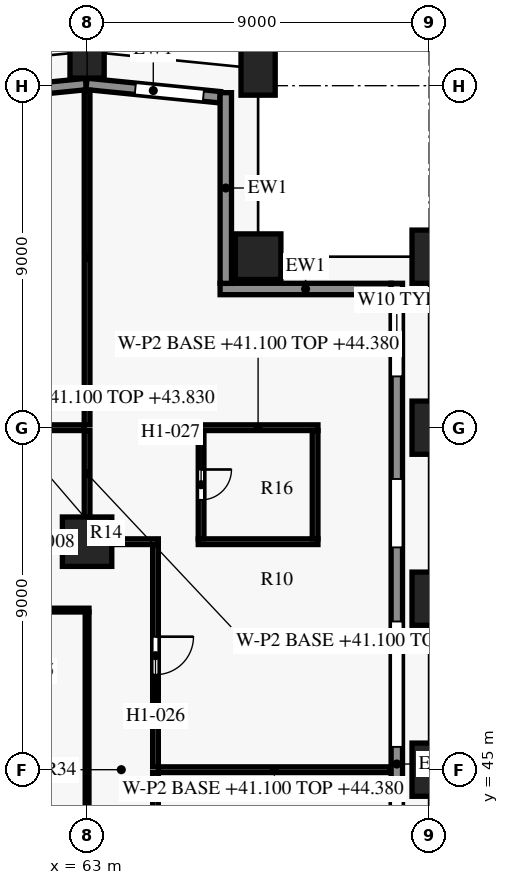
"""IFC4 building model, lengths in metres.
Left out: names, types, materials, properties, quantities, classifications, styles, units other than length and angle.
Written with IfcOpenShell. Run it as: python <this file> out.ifc"""

import sys

from ifc_helpers import new_model, si_unit, direction, frame, frame_2d, origin, origin_2d, place, context, subcontext, project, spatial, rectangle, extrude, element, fill, save


model = new_model("IFC4")
c1 = context("Model", 3, precision=1e-05, world=origin(), true_north=direction((0.0, 1.0)))
c2 = subcontext(c1, "Body", "Model", "MODEL_VIEW")
j1 = project(units=[si_unit("LENGTHUNIT", "METRE"), si_unit("PLANEANGLEUNIT", "RADIAN")], contexts=[c1])
p1 = place(None, origin())
s1 = spatial("IfcSite", under=j1, at=p1, CompositionType="ELEMENT")
p2 = place(p1, origin())
s2 = spatial("IfcBuilding", under=s1, at=p2, CompositionType="ELEMENT")
p3 = place(p2, frame((0.0, 0.0, 41.1)))
s3 = spatial("IfcBuildingStorey", under=s2, at=p3, CompositionType="ELEMENT", Elevation=41.1)
for number, where, z_axis, x_axis in (
    (1, (72.0, 45.0, 0.0), (0.0, 0.0, 1.0), (0.0, 1.0, 0.0)),
    (2, (72.0, 49.5, 0.0), (0.0, 0.0, 1.0), (0.0, 1.0, 0.0)),
    (3, (72.0, 54.0, 0.0), (0.0, 0.0, 1.0), (0.0, 1.0, 0.0)),
    (4, (72.0, 58.5, 0.0), (0.0, 0.0, 1.0), (0.0, 1.0, 0.0)),
    (5, (67.5, 63.45, 0.0), (0.0, 0.0, 1.0), (-0.995, 0.1, 0.0)),
    (6, (63.0, 63.9, 0.0), (0.0, 0.0, 1.0), (-1.0, 0.0, 0.0)),
):
    element("IfcColumn", number, at=place(p3, frame(where, z_axis=z_axis, x_axis=x_axis)), inside=s3, PredefinedType="COLUMN", context=c2, shape_type="SweptSolid", body=[
        extrude(rectangle(XDim=0.9, YDim=1.4, at=origin_2d()), origin(), (0.0, 0.0, 1.0), 3.6),
    ])
p4 = place(p3, frame((67.5, 58.5, 0.0), z_axis=(0.0, 0.0, 1.0), x_axis=(1.0, 0.0, 0.0)))
e7 = element("IfcColumn", 7, at=p4, inside=s3, PredefinedType="COLUMN", context=c2, shape_type="SweptSolid", body=[
    extrude(rectangle(XDim=1.2, YDim=1.2, at=origin_2d()), origin(), (0.0, 0.0, 1.0), 3.6),
])
p5 = place(p3, frame((63.0, 51.0, 0.0), z_axis=(0.0, 0.0, 1.0), x_axis=(1.0, 0.0, 0.0)))
e8 = element("IfcColumn", 8, at=p5, inside=s3, PredefinedType="COLUMN", context=c2, shape_type="SweptSolid", body=[
    extrude(rectangle(XDim=1.3, YDim=1.3, at=origin_2d()), origin(), (0.0, 0.0, 1.0), 3.6),
])
p6 = place(p3, frame((71.15, 57.8, 0.0), z_axis=(0.0, 0.0, 1.0), x_axis=(0.0, -1.0, 0.0)))
e9 = element("IfcWall", 9, at=p6, inside=s3, PredefinedType="SOLIDWALL", context=c2, shape_type="SweptSolid", body=[
    extrude(rectangle(XDim=25.302, YDim=0.3, at=frame_2d((12.651, 0.0))), origin(), (0.0, 0.0, 1.0), 2.95),
])
p7 = place(p6, frame((0.65, 0.0, 0.75)))
e10 = element("IfcOpeningElement", 10, at=p7, cuts=e9, PredefinedType="OPENING", context=c2, shape_type="SweptSolid", body=[
    extrude(rectangle(XDim=1.8, YDim=1.8, at=frame_2d((0.9, 0.9))), frame((0.0, 0.16, 0.0), z_axis=(0.0, -1.0, 0.0), x_axis=(1.0, 0.0, 0.0)), (0.0, 0.0, 1.0), 0.32),
])
p8 = place(p6, frame((5.15, 0.0, 0.75)))
e11 = element("IfcOpeningElement", 11, at=p8, cuts=e9, PredefinedType="OPENING", context=c2, shape_type="SweptSolid", body=[
    extrude(rectangle(XDim=1.8, YDim=1.8, at=frame_2d((0.9, 0.9))), frame((0.0, 0.16, 0.0), z_axis=(0.0, -1.0, 0.0), x_axis=(1.0, 0.0, 0.0)), (0.0, 0.0, 1.0), 0.32),
])
p9 = place(p6, frame((8.9, 0.0, 0.15)))
e12 = element("IfcOpeningElement", 12, at=p9, cuts=e9, PredefinedType="OPENING", context=c2, shape_type="SweptSolid", body=[
    extrude(rectangle(XDim=3.3, YDim=2.4, at=frame_2d((1.65, 1.2))), frame((0.0, 0.16, 0.0), z_axis=(0.0, -1.0, 0.0), x_axis=(1.0, 0.0, 0.0)), (0.0, 0.0, 1.0), 0.32),
])
p10 = place(p6, frame((13.4, 0.0, 0.15)))
e13 = element("IfcOpeningElement", 13, at=p10, cuts=e9, PredefinedType="OPENING", context=c2, shape_type="SweptSolid", body=[
    extrude(rectangle(XDim=3.3, YDim=2.4, at=frame_2d((1.65, 1.2))), frame((0.0, 0.16, 0.0), z_axis=(0.0, -1.0, 0.0), x_axis=(1.0, 0.0, 0.0)), (0.0, 0.0, 1.0), 0.32),
])
p11 = place(p6, frame((18.65, 0.0, 0.75)))
e14 = element("IfcOpeningElement", 14, at=p11, cuts=e9, PredefinedType="OPENING", context=c2, shape_type="SweptSolid", body=[
    extrude(rectangle(XDim=1.8, YDim=1.8, at=frame_2d((0.9, 0.9))), frame((0.0, 0.16, 0.0), z_axis=(0.0, -1.0, 0.0), x_axis=(1.0, 0.0, 0.0)), (0.0, 0.0, 1.0), 0.32),
])
p12 = place(p6, frame((23.15, 0.0, 0.75)))
e15 = element("IfcOpeningElement", 15, at=p12, cuts=e9, PredefinedType="OPENING", context=c2, shape_type="SweptSolid", body=[
    extrude(rectangle(XDim=1.8, YDim=1.8, at=frame_2d((0.9, 0.9))), frame((0.0, 0.16, 0.0), z_axis=(0.0, -1.0, 0.0), x_axis=(1.0, 0.0, 0.0)), (0.0, 0.0, 1.0), 0.32),
])
p13 = place(p3, frame((66.5, 57.65, 0.0), z_axis=(0.0, 0.0, 1.0), x_axis=(1.0, 0.0, 0.0)))
e16 = element("IfcWall", 16, at=p13, inside=s3, PredefinedType="SOLIDWALL", context=c2, shape_type="SweptSolid", body=[
    extrude(rectangle(XDim=4.5, YDim=0.3, at=frame_2d((2.25, 0.0))), origin(), (0.0, 0.0, 1.0), 2.95),
])
p14 = place(p3, frame((66.65, 62.816, 0.0), z_axis=(0.0, 0.0, 1.0), x_axis=(0.0, -1.0, 0.0)))
e17 = element("IfcWall", 17, at=p14, inside=s3, PredefinedType="SOLIDWALL", context=c2, shape_type="SweptSolid", body=[
    extrude(rectangle(XDim=5.018, YDim=0.3, at=frame_2d((2.509, 0.0))), origin(), (0.0, 0.0, 1.0), 2.95),
])
p15 = place(p3, frame((62.985, 63.047, 0.0), z_axis=(0.0, 0.0, 1.0), x_axis=(0.995031712439, -0.099558481511, 0.0)))
e18 = element("IfcWall", 18, at=p15, inside=s3, PredefinedType="SOLIDWALL", context=c2, shape_type="SweptSolid", body=[
    extrude(rectangle(XDim=3.531, YDim=0.3, at=frame_2d((1.766, 0.0))), origin(), (0.0, 0.0, 1.0), 2.95),
])
p16 = place(p15, frame((1.291, 0.0, 0.75)))
e19 = element("IfcOpeningElement", 19, at=p16, cuts=e18, PredefinedType="OPENING", context=c2, shape_type="SweptSolid", body=[
    extrude(rectangle(XDim=1.8, YDim=1.8, at=frame_2d((0.9, 0.9))), frame((0.0, 0.16, 0.0), z_axis=(0.0, -1.0, 0.0), x_axis=(1.0, 0.0, 0.0)), (0.0, 0.0, 1.0), 0.32),
])
p17 = place(p3, frame((53.985, 62.144, 0.0), z_axis=(0.0, 0.0, 1.0), x_axis=(0.995037993253, 0.099495688264, 0.0)))
e20 = element("IfcWall", 20, at=p17, inside=s3, PredefinedType="SOLIDWALL", context=c2, shape_type="SweptSolid", body=[
    extrude(rectangle(XDim=9.03, YDim=0.3, at=frame_2d((4.515, 0.0))), origin(), (0.0, 0.0, 1.0), 2.95),
])
p18 = place(p17, frame((0.711, 0.0, 0.15)))
e21 = element("IfcOpeningElement", 21, at=p18, cuts=e20, PredefinedType="OPENING", context=c2, shape_type="SweptSolid", body=[
    extrude(rectangle(XDim=3.3, YDim=2.4, at=frame_2d((1.65, 1.2))), frame((0.0, 0.16, 0.0), z_axis=(0.0, -1.0, 0.0), x_axis=(1.0, 0.0, 0.0)), (0.0, 0.0, 1.0), 0.32),
])
p19 = place(p17, frame((5.984, 0.0, 0.75)))
e22 = element("IfcOpeningElement", 22, at=p19, cuts=e20, PredefinedType="OPENING", context=c2, shape_type="SweptSolid", body=[
    extrude(rectangle(XDim=1.8, YDim=1.8, at=frame_2d((0.9, 0.9))), frame((0.0, 0.16, 0.0), z_axis=(0.0, -1.0, 0.0), x_axis=(1.0, 0.0, 0.0)), (0.0, 0.0, 1.0), 0.32),
])
p20 = place(p3, frame((63.0, 40.85, 0.0), z_axis=(0.0, 0.0, 1.0), x_axis=(0.0, 1.0, 0.0)))
e23 = element("IfcWall", 23, at=p20, inside=s3, PredefinedType="PARTITIONING", context=c2, shape_type="SweptSolid", body=[
    extrude(rectangle(XDim=8.3, YDim=0.1, at=frame_2d((4.15, 0.0))), origin(), (0.0, 0.0, 1.0), 2.73),
])
p21 = place(p3, frame((64.8, 44.925, 0.0), z_axis=(0.0, 0.0, 1.0), x_axis=(0.0, -1.0, 0.0)))
e24 = element("IfcWall", 24, at=p21, inside=s3, PredefinedType="PARTITIONING", context=c2, shape_type="SweptSolid", body=[
    extrude(rectangle(XDim=5.85, YDim=0.15, at=frame_2d((2.925, 0.0))), origin(), (0.0, 0.0, 1.0), 2.58),
])
p22 = place(p21, frame((2.425, 0.0, 0.0)))
e25 = element("IfcOpeningElement", 25, at=p22, cuts=e24, PredefinedType="OPENING", context=c2, shape_type="SweptSolid", body=[
    extrude(rectangle(XDim=1.0, YDim=2.1, at=frame_2d((0.5, 1.05))), frame((0.0, 0.085, 0.0), z_axis=(0.0, -1.0, 0.0), x_axis=(1.0, 0.0, 0.0)), (0.0, 0.0, 1.0), 0.17),
])
p23 = place(p3, frame((70.98, 45.0, 0.0), z_axis=(0.0, 0.0, 1.0), x_axis=(-1.0, 0.0, 0.0)))
e26 = element("IfcWall", 26, at=p23, inside=s3, PredefinedType="PARTITIONING", context=c2, shape_type="SweptSolid", body=[
    extrude(rectangle(XDim=6.105, YDim=0.15, at=frame_2d((3.052, 0.0))), origin(), (0.0, 0.0, 1.0), 3.28),
])
p24 = place(p3, frame((63.05, 49.2, 0.0), z_axis=(0.0, 0.0, 1.0), x_axis=(-1.0, 0.0, 0.0)))
e27 = element("IfcWall", 27, at=p24, inside=s3, PredefinedType="PARTITIONING", context=c2, shape_type="SweptSolid", body=[
    extrude(rectangle(XDim=3.35, YDim=0.1, at=frame_2d((1.675, 0.0))), origin(), (0.0, 0.0, 1.0), 2.73),
])
p25 = place(p24, frame((1.25, 0.0, 0.0)))
e28 = element("IfcOpeningElement", 28, at=p25, cuts=e27, PredefinedType="OPENING", context=c2, shape_type="SweptSolid", body=[
    extrude(rectangle(XDim=0.9, YDim=2.1, at=frame_2d((0.45, 1.05))), frame((0.0, 0.06, 0.0), z_axis=(0.0, -1.0, 0.0), x_axis=(1.0, 0.0, 0.0)), (0.0, 0.0, 1.0), 0.12),
])
p26 = place(p3, frame((64.8, 50.925, 0.0), z_axis=(0.0, 0.0, 1.0), x_axis=(0.0, -1.0, 0.0)))
e29 = element("IfcWall", 29, at=p26, inside=s3, PredefinedType="PARTITIONING", context=c2, shape_type="SweptSolid", body=[
    extrude(rectangle(XDim=5.85, YDim=0.15, at=frame_2d((2.925, 0.0))), origin(), (0.0, 0.0, 1.0), 2.58),
])
p27 = place(p26, frame((2.425, 0.0, 0.0)))
e30 = element("IfcOpeningElement", 30, at=p27, cuts=e29, PredefinedType="OPENING", context=c2, shape_type="SweptSolid", body=[
    extrude(rectangle(XDim=1.0, YDim=2.1, at=frame_2d((0.5, 1.05))), frame((0.0, 0.085, 0.0), z_axis=(0.0, -1.0, 0.0), x_axis=(1.0, 0.0, 0.0)), (0.0, 0.0, 1.0), 0.17),
])
p28 = place(p3, frame((60.9, 51.0, 0.0), z_axis=(0.0, 0.0, 1.0), x_axis=(1.0, 0.0, 0.0)))
e31 = element("IfcWall", 31, at=p28, inside=s3, PredefinedType="PARTITIONING", context=c2, shape_type="SweptSolid", body=[
    extrude(rectangle(XDim=1.445, YDim=0.15, at=frame_2d((0.723, 0.0))), origin(), (0.0, 0.0, 1.0), 2.58),
])
p29 = place(p3, frame((63.655, 51.0, 0.0), z_axis=(0.0, 0.0, 1.0), x_axis=(1.0, 0.0, 0.0)))
e32 = element("IfcWall", 32, at=p29, inside=s3, PredefinedType="PARTITIONING", context=c2, shape_type="SweptSolid", body=[
    extrude(rectangle(XDim=1.22, YDim=0.15, at=frame_2d((0.61, 0.0))), origin(), (0.0, 0.0, 1.0), 2.58),
])
p30 = place(p3, frame((65.925, 51.0, 0.0), z_axis=(0.0, 0.0, 1.0), x_axis=(1.0, 0.0, 0.0)))
e33 = element("IfcWall", 33, at=p30, inside=s3, PredefinedType="PARTITIONING", context=c2, shape_type="SweptSolid", body=[
    extrude(rectangle(XDim=3.15, YDim=0.15, at=frame_2d((1.575, 0.0))), origin(), (0.0, 0.0, 1.0), 2.58),
])
p31 = place(p3, frame((69.0, 51.075, 0.0), z_axis=(0.0, 0.0, 1.0), x_axis=(0.0, 1.0, 0.0)))
e34 = element("IfcWall", 34, at=p31, inside=s3, PredefinedType="PARTITIONING", context=c2, shape_type="SweptSolid", body=[
    extrude(rectangle(XDim=2.85, YDim=0.15, at=frame_2d((1.425, 0.0))), origin(), (0.0, 0.0, 1.0), 2.58),
])
p32 = place(p3, frame((63.0, 53.925, 0.0), z_axis=(0.0, 0.0, 1.0), x_axis=(0.0, -1.0, 0.0)))
e35 = element("IfcWall", 35, at=p32, inside=s3, PredefinedType="PARTITIONING", context=c2, shape_type="SweptSolid", body=[
    extrude(rectangle(XDim=2.27, YDim=0.15, at=frame_2d((1.135, 0.0))), origin(), (0.0, 0.0, 1.0), 2.73),
])
p33 = place(p3, frame((66.0, 53.925, 0.0), z_axis=(0.0, 0.0, 1.0), x_axis=(0.0, -1.0, 0.0)))
e36 = element("IfcWall", 36, at=p33, inside=s3, PredefinedType="PARTITIONING", context=c2, shape_type="SweptSolid", body=[
    extrude(rectangle(XDim=2.85, YDim=0.15, at=frame_2d((1.425, 0.0))), origin(), (0.0, 0.0, 1.0), 2.58),
])
p34 = place(p33, frame((1.025, 0.0, 0.0)))
e37 = element("IfcOpeningElement", 37, at=p34, cuts=e36, PredefinedType="OPENING", context=c2, shape_type="SweptSolid", body=[
    extrude(rectangle(XDim=0.8, YDim=2.1, at=frame_2d((0.4, 1.05))), frame((0.0, 0.085, 0.0), z_axis=(0.0, -1.0, 0.0), x_axis=(1.0, 0.0, 0.0)), (0.0, 0.0, 1.0), 0.17),
])
p35 = place(p3, frame((62.925, 54.0, 0.0), z_axis=(0.0, 0.0, 1.0), x_axis=(-1.0, 0.0, 0.0)))
e38 = element("IfcWall", 38, at=p35, inside=s3, PredefinedType="PARTITIONING", context=c2, shape_type="SweptSolid", body=[
    extrude(rectangle(XDim=2.1, YDim=0.15, at=frame_2d((1.05, 0.0))), origin(), (0.0, 0.0, 1.0), 2.73),
])
p36 = place(p3, frame((69.075, 54.0, 0.0), z_axis=(0.0, 0.0, 1.0), x_axis=(-1.0, 0.0, 0.0)))
e39 = element("IfcWall", 39, at=p36, inside=s3, PredefinedType="PARTITIONING", context=c2, shape_type="SweptSolid", body=[
    extrude(rectangle(XDim=3.15, YDim=0.15, at=frame_2d((1.575, 0.0))), origin(), (0.0, 0.0, 1.0), 3.28),
])
p37 = place(p3, frame((63.0, 62.875, 0.0), z_axis=(0.0, 0.0, 1.0), x_axis=(0.0, -1.0, 0.0)))
e40 = element("IfcWall", 40, at=p37, inside=s3, PredefinedType="PARTITIONING", context=c2, shape_type="SweptSolid", body=[
    extrude(rectangle(XDim=8.8, YDim=0.15, at=frame_2d((4.4, 0.0))), origin(), (0.0, 0.0, 1.0), 2.73),
])
p38 = place(p7, origin())
e41 = element("IfcWindow", 41, at=p38, inside=s3, PartitioningType="SINGLE_PANEL", PredefinedType="WINDOW", context=c2, shape_type="SweptSolid", body=[
    extrude(rectangle(XDim=1.8, YDim=1.8, at=frame_2d((0.9, 0.9))), frame((0.0, 0.03, 0.0), z_axis=(0.0, -1.0, 0.0), x_axis=(1.0, 0.0, 0.0)), (0.0, 0.0, 1.0), 0.06),
])
fill(e10, e41)
p39 = place(p8, origin())
e42 = element("IfcWindow", 42, at=p39, inside=s3, PartitioningType="SINGLE_PANEL", PredefinedType="WINDOW", context=c2, shape_type="SweptSolid", body=[
    extrude(rectangle(XDim=1.8, YDim=1.8, at=frame_2d((0.9, 0.9))), frame((0.0, 0.03, 0.0), z_axis=(0.0, -1.0, 0.0), x_axis=(1.0, 0.0, 0.0)), (0.0, 0.0, 1.0), 0.06),
])
fill(e11, e42)
p40 = place(p9, origin())
e43 = element("IfcWindow", 43, at=p40, inside=s3, PartitioningType="SINGLE_PANEL", PredefinedType="WINDOW", context=c2, shape_type="SweptSolid", body=[
    extrude(rectangle(XDim=3.3, YDim=2.4, at=frame_2d((1.65, 1.2))), frame((0.0, 0.03, 0.0), z_axis=(0.0, -1.0, 0.0), x_axis=(1.0, 0.0, 0.0)), (0.0, 0.0, 1.0), 0.06),
])
fill(e12, e43)
p41 = place(p10, origin())
e44 = element("IfcWindow", 44, at=p41, inside=s3, PartitioningType="SINGLE_PANEL", PredefinedType="WINDOW", context=c2, shape_type="SweptSolid", body=[
    extrude(rectangle(XDim=3.3, YDim=2.4, at=frame_2d((1.65, 1.2))), frame((0.0, 0.03, 0.0), z_axis=(0.0, -1.0, 0.0), x_axis=(1.0, 0.0, 0.0)), (0.0, 0.0, 1.0), 0.06),
])
fill(e13, e44)
p42 = place(p16, origin())
e45 = element("IfcWindow", 45, at=p42, inside=s3, PartitioningType="SINGLE_PANEL", PredefinedType="WINDOW", context=c2, shape_type="SweptSolid", body=[
    extrude(rectangle(XDim=1.8, YDim=1.8, at=frame_2d((0.9, 0.9))), frame((0.0, 0.03, 0.0), z_axis=(0.0, -1.0, 0.0), x_axis=(1.0, 0.0, 0.0)), (0.0, 0.0, 1.0), 0.06),
])
fill(e19, e45)
p43 = place(p27, origin())
e46 = element("IfcDoor", 46, at=p43, inside=s3, OperationType="SINGLE_SWING_LEFT", PredefinedType="DOOR", context=c2, shape_type="SweptSolid", body=[
    extrude(rectangle(XDim=1.0, YDim=2.1, at=frame_2d((0.5, 1.05))), frame((0.0, 0.025, 0.0), z_axis=(0.0, -1.0, 0.0), x_axis=(1.0, 0.0, 0.0)), (0.0, 0.0, 1.0), 0.05),
])
fill(e30, e46)
p44 = place(p34, origin())
e47 = element("IfcDoor", 47, at=p44, inside=s3, OperationType="SINGLE_SWING_RIGHT", PredefinedType="DOOR", context=c2, shape_type="SweptSolid", body=[
    extrude(rectangle(XDim=0.8, YDim=2.1, at=frame_2d((0.4, 1.05))), frame((0.0, 0.025, 0.0), z_axis=(0.0, -1.0, 0.0), x_axis=(1.0, 0.0, 0.0)), (0.0, 0.0, 1.0), 0.05),
])
fill(e37, e47)
save(model, sys.argv[1])
